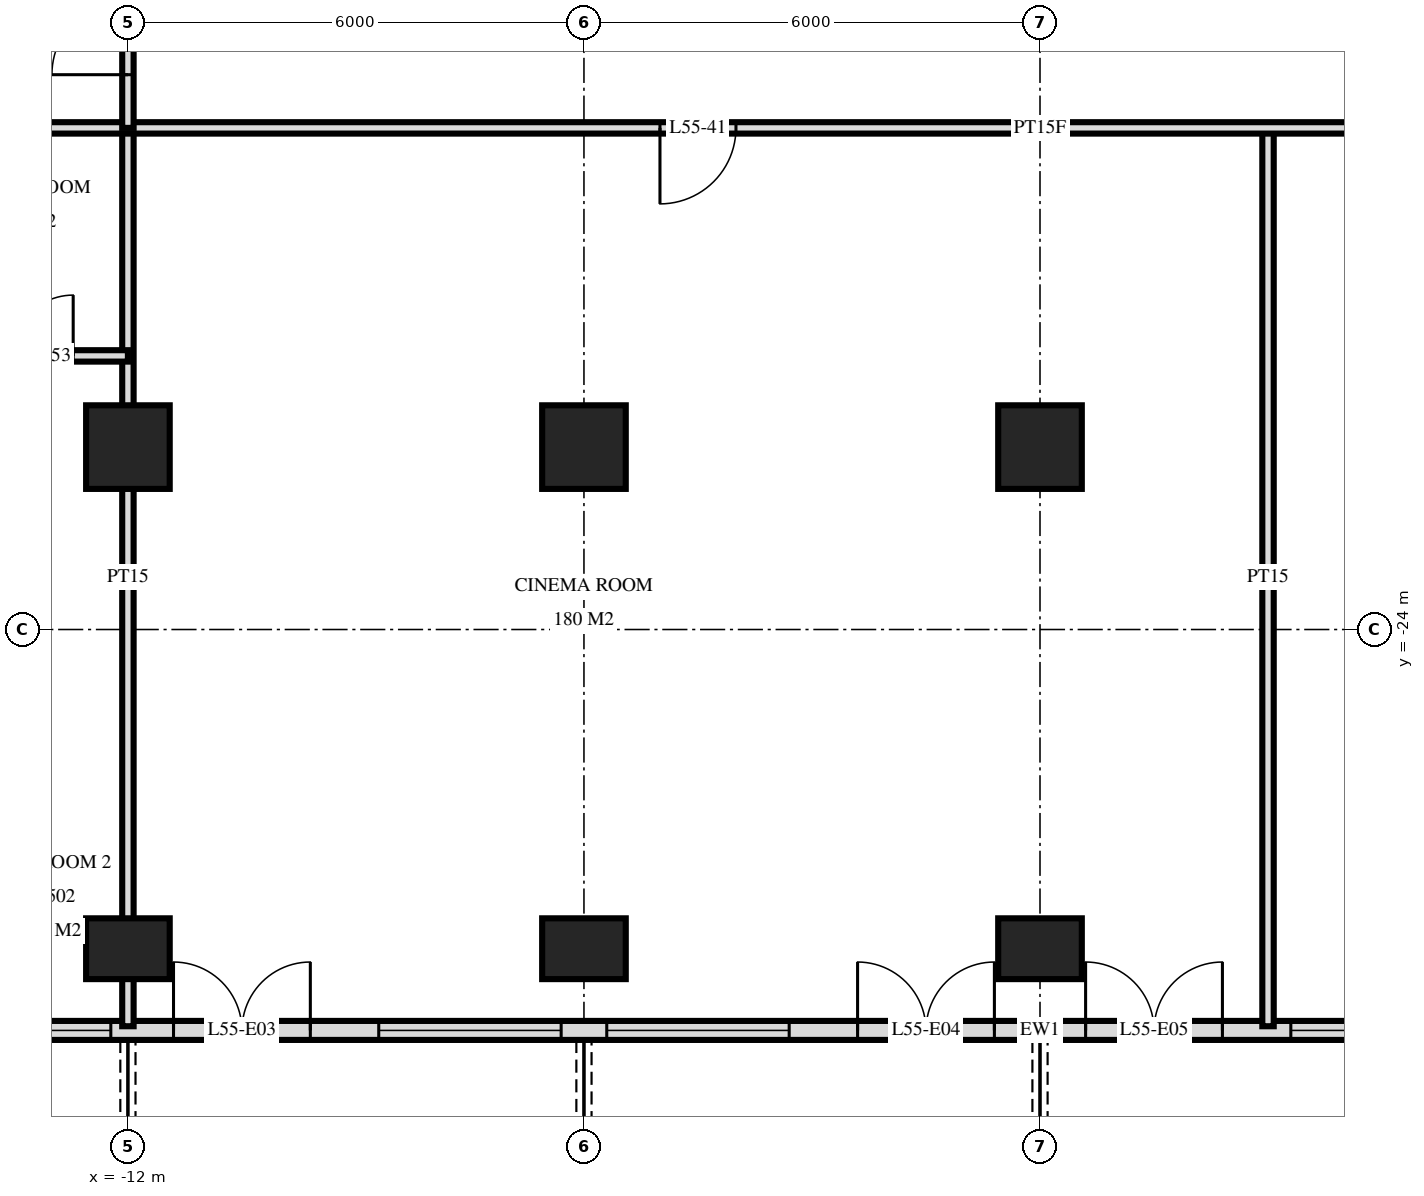
"""IFC4 building model, lengths in metres.
Left out: names, types, materials, properties, quantities, classifications, styles, units other than length and angle.
Written with IfcOpenShell. Run it as: python <this file> out.ifc"""

import sys

from ifc_helpers import new_model, si_unit, direction, frame, frame_2d, origin, origin_2d, place, context, subcontext, project, spatial, rectangle, extrude, element, fill, save


model = new_model("IFC4")
c1 = context("Model", 3, precision=1e-05, world=origin(), true_north=direction((0.0, 1.0)))
c2 = subcontext(c1, "Body", "Model", "MODEL_VIEW")
j1 = project(units=[si_unit("LENGTHUNIT", "METRE"), si_unit("PLANEANGLEUNIT", "RADIAN")], contexts=[c1])
p1 = place(None, origin())
s1 = spatial("IfcSite", under=j1, at=p1, CompositionType="ELEMENT")
p2 = place(p1, origin())
s2 = spatial("IfcBuilding", under=s1, at=p2, CompositionType="ELEMENT")
p3 = place(p2, frame((0.0, 0.0, 211.6)))
s3 = spatial("IfcBuildingStorey", under=s2, at=p3, CompositionType="ELEMENT", Elevation=211.6)
p4 = place(p3, frame((-12.0, -28.2, 0.0), z_axis=(0.0, 0.0, 1.0), x_axis=(1.0, 0.0, 0.0)))
e1 = element("IfcColumn", 1, at=p4, inside=s3, PredefinedType="COLUMN", context=c2, shape_type="SweptSolid", body=[
    extrude(rectangle(XDim=1.1, YDim=0.8, at=origin_2d()), origin(), (0.0, 0.0, 1.0), 3.5),
])
p5 = place(p3, frame((-12.0, -21.6, 0.0), z_axis=(0.0, 0.0, 1.0), x_axis=(1.0, 0.0, 0.0)))
e2 = element("IfcColumn", 2, at=p5, inside=s3, PredefinedType="COLUMN", context=c2, shape_type="SweptSolid", body=[
    extrude(rectangle(XDim=1.1, YDim=1.1, at=origin_2d()), origin(), (0.0, 0.0, 1.0), 3.5),
])
p6 = place(p3, frame((-6.0, -28.2, 0.0), z_axis=(0.0, 0.0, 1.0), x_axis=(1.0, 0.0, 0.0)))
e3 = element("IfcColumn", 3, at=p6, inside=s3, PredefinedType="COLUMN", context=c2, shape_type="SweptSolid", body=[
    extrude(rectangle(XDim=1.1, YDim=0.8, at=origin_2d()), origin(), (0.0, 0.0, 1.0), 3.5),
])
p7 = place(p3, frame((-6.0, -21.6, 0.0), z_axis=(0.0, 0.0, 1.0), x_axis=(1.0, 0.0, 0.0)))
e4 = element("IfcColumn", 4, at=p7, inside=s3, PredefinedType="COLUMN", context=c2, shape_type="SweptSolid", body=[
    extrude(rectangle(XDim=1.1, YDim=1.1, at=origin_2d()), origin(), (0.0, 0.0, 1.0), 3.5),
])
p8 = place(p3, frame((0.0, -28.2, 0.0), z_axis=(0.0, 0.0, 1.0), x_axis=(1.0, 0.0, 0.0)))
e5 = element("IfcColumn", 5, at=p8, inside=s3, PredefinedType="COLUMN", context=c2, shape_type="SweptSolid", body=[
    extrude(rectangle(XDim=1.1, YDim=0.8, at=origin_2d()), origin(), (0.0, 0.0, 1.0), 3.5),
])
p9 = place(p3, frame((0.0, -21.6, 0.0), z_axis=(0.0, 0.0, 1.0), x_axis=(1.0, 0.0, 0.0)))
e6 = element("IfcColumn", 6, at=p9, inside=s3, PredefinedType="COLUMN", context=c2, shape_type="SweptSolid", body=[
    extrude(rectangle(XDim=1.1, YDim=1.1, at=origin_2d()), origin(), (0.0, 0.0, 1.0), 3.5),
])
p10 = place(p3, frame((-22.475, -29.275, 0.0), z_axis=(0.0, 0.0, 1.0), x_axis=(1.0, 0.0, 0.0)))
e7 = element("IfcWall", 7, at=p10, inside=s3, PredefinedType="SOLIDWALL", context=c2, shape_type="SweptSolid", body=[
    extrude(rectangle(XDim=44.951, YDim=0.25, at=frame_2d((22.475, 0.0))), origin(), (0.0, 0.0, 1.0), 3.22),
])
p11 = place(p10, frame((0.575, 0.0, 0.0)))
e8 = element("IfcOpeningElement", 8, at=p11, cuts=e7, PredefinedType="OPENING", context=c2, shape_type="SweptSolid", body=[
    extrude(rectangle(XDim=1.8, YDim=2.4, at=frame_2d((0.9, 1.2))), frame((0.0, 0.135, 0.0), z_axis=(0.0, -1.0, 0.0), x_axis=(1.0, 0.0, 0.0)), (0.0, 0.0, 1.0), 0.27),
])
p12 = place(p10, frame((6.2, 0.0, 0.0)))
e9 = element("IfcOpeningElement", 9, at=p12, cuts=e7, PredefinedType="OPENING", context=c2, shape_type="SweptSolid", body=[
    extrude(rectangle(XDim=1.8, YDim=2.4, at=frame_2d((0.9, 1.2))), frame((0.0, 0.135, 0.0), z_axis=(0.0, -1.0, 0.0), x_axis=(1.0, 0.0, 0.0)), (0.0, 0.0, 1.0), 0.27),
])
p13 = place(p10, frame((8.45, 0.0, 0.9)))
e10 = element("IfcOpeningElement", 10, at=p13, cuts=e7, PredefinedType="OPENING", context=c2, shape_type="SweptSolid", body=[
    extrude(rectangle(XDim=1.8, YDim=1.5, at=frame_2d((0.9, 0.75))), frame((0.0, 0.135, 0.0), z_axis=(0.0, -1.0, 0.0), x_axis=(1.0, 0.0, 0.0)), (0.0, 0.0, 1.0), 0.27),
])
p14 = place(p10, frame((11.075, 0.0, 0.0)))
e11 = element("IfcOpeningElement", 11, at=p14, cuts=e7, PredefinedType="OPENING", context=c2, shape_type="SweptSolid", body=[
    extrude(rectangle(XDim=1.8, YDim=2.4, at=frame_2d((0.9, 1.2))), frame((0.0, 0.135, 0.0), z_axis=(0.0, -1.0, 0.0), x_axis=(1.0, 0.0, 0.0)), (0.0, 0.0, 1.0), 0.27),
])
p15 = place(p10, frame((13.775, 0.0, 0.9)))
e12 = element("IfcOpeningElement", 12, at=p15, cuts=e7, PredefinedType="OPENING", context=c2, shape_type="SweptSolid", body=[
    extrude(rectangle(XDim=2.4, YDim=1.5, at=frame_2d((1.2, 0.75))), frame((0.0, 0.135, 0.0), z_axis=(0.0, -1.0, 0.0), x_axis=(1.0, 0.0, 0.0)), (0.0, 0.0, 1.0), 0.27),
])
p16 = place(p10, frame((16.775, 0.0, 0.9)))
e13 = element("IfcOpeningElement", 13, at=p16, cuts=e7, PredefinedType="OPENING", context=c2, shape_type="SweptSolid", body=[
    extrude(rectangle(XDim=2.4, YDim=1.5, at=frame_2d((1.2, 0.75))), frame((0.0, 0.135, 0.0), z_axis=(0.0, -1.0, 0.0), x_axis=(1.0, 0.0, 0.0)), (0.0, 0.0, 1.0), 0.27),
])
p17 = place(p10, frame((20.075, 0.0, 0.0)))
e14 = element("IfcOpeningElement", 14, at=p17, cuts=e7, PredefinedType="OPENING", context=c2, shape_type="SweptSolid", body=[
    extrude(rectangle(XDim=1.8, YDim=2.4, at=frame_2d((0.9, 1.2))), frame((0.0, 0.135, 0.0), z_axis=(0.0, -1.0, 0.0), x_axis=(1.0, 0.0, 0.0)), (0.0, 0.0, 1.0), 0.27),
])
p18 = place(p10, frame((23.075, 0.0, 0.0)))
e15 = element("IfcOpeningElement", 15, at=p18, cuts=e7, PredefinedType="OPENING", context=c2, shape_type="SweptSolid", body=[
    extrude(rectangle(XDim=1.8, YDim=2.4, at=frame_2d((0.9, 1.2))), frame((0.0, 0.135, 0.0), z_axis=(0.0, -1.0, 0.0), x_axis=(1.0, 0.0, 0.0)), (0.0, 0.0, 1.0), 0.27),
])
p19 = place(p10, frame((25.775, 0.0, 0.9)))
e16 = element("IfcOpeningElement", 16, at=p19, cuts=e7, PredefinedType="OPENING", context=c2, shape_type="SweptSolid", body=[
    extrude(rectangle(XDim=2.4, YDim=1.5, at=frame_2d((1.2, 0.75))), frame((0.0, 0.135, 0.0), z_axis=(0.0, -1.0, 0.0), x_axis=(1.0, 0.0, 0.0)), (0.0, 0.0, 1.0), 0.27),
])
p20 = place(p10, frame((29.075, 0.0, 0.0)))
e17 = element("IfcOpeningElement", 17, at=p20, cuts=e7, PredefinedType="OPENING", context=c2, shape_type="SweptSolid", body=[
    extrude(rectangle(XDim=1.8, YDim=2.4, at=frame_2d((0.9, 1.2))), frame((0.0, 0.135, 0.0), z_axis=(0.0, -1.0, 0.0), x_axis=(1.0, 0.0, 0.0)), (0.0, 0.0, 1.0), 0.27),
])
p21 = place(p10, frame((31.775, 0.0, 0.9)))
e18 = element("IfcOpeningElement", 18, at=p21, cuts=e7, PredefinedType="OPENING", context=c2, shape_type="SweptSolid", body=[
    extrude(rectangle(XDim=2.4, YDim=1.5, at=frame_2d((1.2, 0.75))), frame((0.0, 0.135, 0.0), z_axis=(0.0, -1.0, 0.0), x_axis=(1.0, 0.0, 0.0)), (0.0, 0.0, 1.0), 0.27),
])
p22 = place(p10, frame((34.775, 0.0, 0.9)))
e19 = element("IfcOpeningElement", 19, at=p22, cuts=e7, PredefinedType="OPENING", context=c2, shape_type="SweptSolid", body=[
    extrude(rectangle(XDim=2.4, YDim=1.5, at=frame_2d((1.2, 0.75))), frame((0.0, 0.135, 0.0), z_axis=(0.0, -1.0, 0.0), x_axis=(1.0, 0.0, 0.0)), (0.0, 0.0, 1.0), 0.27),
])
p23 = place(p10, frame((38.075, 0.0, 0.0)))
e20 = element("IfcOpeningElement", 20, at=p23, cuts=e7, PredefinedType="OPENING", context=c2, shape_type="SweptSolid", body=[
    extrude(rectangle(XDim=1.8, YDim=2.4, at=frame_2d((0.9, 1.2))), frame((0.0, 0.135, 0.0), z_axis=(0.0, -1.0, 0.0), x_axis=(1.0, 0.0, 0.0)), (0.0, 0.0, 1.0), 0.27),
])
p24 = place(p10, frame((41.075, 0.0, 0.0)))
e21 = element("IfcOpeningElement", 21, at=p24, cuts=e7, PredefinedType="OPENING", context=c2, shape_type="SweptSolid", body=[
    extrude(rectangle(XDim=1.8, YDim=2.4, at=frame_2d((0.9, 1.2))), frame((0.0, 0.135, 0.0), z_axis=(0.0, -1.0, 0.0), x_axis=(1.0, 0.0, 0.0)), (0.0, 0.0, 1.0), 0.27),
])
p25 = place(p3, frame((3.0, -29.22, 0.0), z_axis=(0.0, 0.0, 1.0), x_axis=(0.0, 1.0, 0.0)))
e22 = element("IfcWall", 22, at=p25, inside=s3, PredefinedType="PARTITIONING", context=c2, shape_type="SweptSolid", body=[
    extrude(rectangle(XDim=11.82, YDim=0.15, at=frame_2d((5.91, 0.0))), origin(), (0.0, 0.0, 1.0), 3.22),
])
p26 = place(p3, frame((-12.0, -17.4, 0.0), z_axis=(0.0, 0.0, 1.0), x_axis=(0.0, 1.0, 0.0)))
e23 = element("IfcWall", 23, at=p26, inside=s3, PredefinedType="PARTITIONING", context=c2, shape_type="SweptSolid", body=[
    extrude(rectangle(XDim=2.35, YDim=0.15, at=frame_2d((1.175, 0.0))), origin(), (0.0, 0.0, 1.0), 3.22),
])
p27 = place(p26, frame((0.7, 0.0, 0.0)))
e24 = element("IfcOpeningElement", 24, at=p27, cuts=e23, PredefinedType="OPENING", context=c2, shape_type="SweptSolid", body=[
    extrude(rectangle(XDim=1.0, YDim=2.1, at=frame_2d((0.5, 1.05))), frame((0.0, 0.085, 0.0), z_axis=(0.0, -1.0, 0.0), x_axis=(1.0, 0.0, 0.0)), (0.0, 0.0, 1.0), 0.17),
])
p28 = place(p3, frame((-12.0, -29.22, 0.0), z_axis=(0.0, 0.0, 1.0), x_axis=(0.0, 1.0, 0.0)))
e25 = element("IfcWall", 25, at=p28, inside=s3, PredefinedType="PARTITIONING", context=c2, shape_type="SweptSolid", body=[
    extrude(rectangle(XDim=11.82, YDim=0.15, at=frame_2d((5.91, 0.0))), origin(), (0.0, 0.0, 1.0), 3.22),
])
p29 = place(p3, frame((-14.25, -20.4, 0.0), z_axis=(0.0, 0.0, 1.0), x_axis=(1.0, 0.0, 0.0)))
e26 = element("IfcWall", 26, at=p29, inside=s3, PredefinedType="PARTITIONING", context=c2, shape_type="SweptSolid", body=[
    extrude(rectangle(XDim=2.25, YDim=0.15, at=frame_2d((1.125, 0.0))), origin(), (0.0, 0.0, 1.0), 3.22),
])
p30 = place(p29, frame((0.73, 0.0, 0.0)))
e27 = element("IfcOpeningElement", 27, at=p30, cuts=e26, PredefinedType="OPENING", context=c2, shape_type="SweptSolid", body=[
    extrude(rectangle(XDim=0.8, YDim=2.1, at=frame_2d((0.4, 1.05))), frame((0.0, 0.085, 0.0), z_axis=(0.0, -1.0, 0.0), x_axis=(1.0, 0.0, 0.0)), (0.0, 0.0, 1.0), 0.17),
])
p31 = place(p3, frame((-26.82, -17.4, 0.0), z_axis=(0.0, 0.0, 1.0), x_axis=(1.0, 0.0, 0.0)))
e28 = element("IfcWall", 28, at=p31, inside=s3, PredefinedType="PARTITIONING", context=c2, shape_type="SweptSolid", body=[
    extrude(rectangle(XDim=53.64, YDim=0.15, at=frame_2d((26.82, 0.0))), origin(), (0.0, 0.0, 1.0), 3.22),
])
p32 = place(p31, frame((4.92, 0.0, 0.0)))
e29 = element("IfcOpeningElement", 29, at=p32, cuts=e28, PredefinedType="OPENING", context=c2, shape_type="SweptSolid", body=[
    extrude(rectangle(XDim=1.0, YDim=2.1, at=frame_2d((0.5, 1.05))), frame((0.0, 0.085, 0.0), z_axis=(0.0, -1.0, 0.0), x_axis=(1.0, 0.0, 0.0)), (0.0, 0.0, 1.0), 0.17),
])
p33 = place(p31, frame((1.62, 0.0, 0.0)))
e30 = element("IfcOpeningElement", 30, at=p33, cuts=e28, PredefinedType="OPENING", context=c2, shape_type="SweptSolid", body=[
    extrude(rectangle(XDim=1.0, YDim=2.1, at=frame_2d((0.5, 1.05))), frame((0.0, 0.085, 0.0), z_axis=(0.0, -1.0, 0.0), x_axis=(1.0, 0.0, 0.0)), (0.0, 0.0, 1.0), 0.17),
])
p34 = place(p31, frame((41.17, 0.0, 0.0)))
e31 = element("IfcOpeningElement", 31, at=p34, cuts=e28, PredefinedType="OPENING", context=c2, shape_type="SweptSolid", body=[
    extrude(rectangle(XDim=1.0, YDim=2.1, at=frame_2d((0.5, 1.05))), frame((0.0, 0.085, 0.0), z_axis=(0.0, -1.0, 0.0), x_axis=(1.0, 0.0, 0.0)), (0.0, 0.0, 1.0), 0.17),
])
p35 = place(p31, frame((49.42, 0.0, 0.0)))
e32 = element("IfcOpeningElement", 32, at=p35, cuts=e28, PredefinedType="OPENING", context=c2, shape_type="SweptSolid", body=[
    extrude(rectangle(XDim=1.0, YDim=2.1, at=frame_2d((0.5, 1.05))), frame((0.0, 0.085, 0.0), z_axis=(0.0, -1.0, 0.0), x_axis=(1.0, 0.0, 0.0)), (0.0, 0.0, 1.0), 0.17),
])
p36 = place(p31, frame((47.62, 0.0, 0.0)))
e33 = element("IfcOpeningElement", 33, at=p36, cuts=e28, PredefinedType="OPENING", context=c2, shape_type="SweptSolid", body=[
    extrude(rectangle(XDim=1.0, YDim=2.1, at=frame_2d((0.5, 1.05))), frame((0.0, 0.085, 0.0), z_axis=(0.0, -1.0, 0.0), x_axis=(1.0, 0.0, 0.0)), (0.0, 0.0, 1.0), 0.17),
])
p37 = place(p31, frame((21.82, 0.0, 0.0)))
e34 = element("IfcOpeningElement", 34, at=p37, cuts=e28, PredefinedType="OPENING", context=c2, shape_type="SweptSolid", body=[
    extrude(rectangle(XDim=1.0, YDim=2.1, at=frame_2d((0.5, 1.05))), frame((0.0, 0.085, 0.0), z_axis=(0.0, -1.0, 0.0), x_axis=(1.0, 0.0, 0.0)), (0.0, 0.0, 1.0), 0.17),
])
p38 = place(p31, frame((33.82, 0.0, 0.0)))
e35 = element("IfcOpeningElement", 35, at=p38, cuts=e28, PredefinedType="OPENING", context=c2, shape_type="SweptSolid", body=[
    extrude(rectangle(XDim=1.0, YDim=2.1, at=frame_2d((0.5, 1.05))), frame((0.0, 0.085, 0.0), z_axis=(0.0, -1.0, 0.0), x_axis=(1.0, 0.0, 0.0)), (0.0, 0.0, 1.0), 0.17),
])
p39 = place(p13, origin())
e36 = element("IfcWindow", 36, at=p39, inside=s3, PartitioningType="SINGLE_PANEL", PredefinedType="WINDOW", context=c2, shape_type="SweptSolid", body=[
    extrude(rectangle(XDim=1.8, YDim=1.5, at=frame_2d((0.9, 0.75))), frame((0.0, 0.03, 0.0), z_axis=(0.0, -1.0, 0.0), x_axis=(1.0, 0.0, 0.0)), (0.0, 0.0, 1.0), 0.06),
])
fill(e10, e36)
p40 = place(p14, origin())
e37 = element("IfcDoor", 37, at=p40, inside=s3, OperationType="DOUBLE_DOOR_SINGLE_SWING", PredefinedType="DOOR", context=c2, shape_type="SweptSolid", body=[
    extrude(rectangle(XDim=1.8, YDim=2.4, at=frame_2d((0.9, 1.2))), frame((0.0, 0.025, 0.0), z_axis=(0.0, -1.0, 0.0), x_axis=(1.0, 0.0, 0.0)), (0.0, 0.0, 1.0), 0.05),
])
fill(e11, e37)
p41 = place(p15, origin())
e38 = element("IfcWindow", 38, at=p41, inside=s3, PartitioningType="SINGLE_PANEL", PredefinedType="WINDOW", context=c2, shape_type="SweptSolid", body=[
    extrude(rectangle(XDim=2.4, YDim=1.5, at=frame_2d((1.2, 0.75))), frame((0.0, 0.03, 0.0), z_axis=(0.0, -1.0, 0.0), x_axis=(1.0, 0.0, 0.0)), (0.0, 0.0, 1.0), 0.06),
])
fill(e12, e38)
p42 = place(p16, origin())
e39 = element("IfcWindow", 39, at=p42, inside=s3, PartitioningType="SINGLE_PANEL", PredefinedType="WINDOW", context=c2, shape_type="SweptSolid", body=[
    extrude(rectangle(XDim=2.4, YDim=1.5, at=frame_2d((1.2, 0.75))), frame((0.0, 0.03, 0.0), z_axis=(0.0, -1.0, 0.0), x_axis=(1.0, 0.0, 0.0)), (0.0, 0.0, 1.0), 0.06),
])
fill(e13, e39)
p43 = place(p17, origin())
e40 = element("IfcDoor", 40, at=p43, inside=s3, OperationType="DOUBLE_DOOR_SINGLE_SWING", PredefinedType="DOOR", context=c2, shape_type="SweptSolid", body=[
    extrude(rectangle(XDim=1.8, YDim=2.4, at=frame_2d((0.9, 1.2))), frame((0.0, 0.025, 0.0), z_axis=(0.0, -1.0, 0.0), x_axis=(1.0, 0.0, 0.0)), (0.0, 0.0, 1.0), 0.05),
])
fill(e14, e40)
p44 = place(p18, origin())
e41 = element("IfcDoor", 41, at=p44, inside=s3, OperationType="DOUBLE_DOOR_SINGLE_SWING", PredefinedType="DOOR", context=c2, shape_type="SweptSolid", body=[
    extrude(rectangle(XDim=1.8, YDim=2.4, at=frame_2d((0.9, 1.2))), frame((0.0, 0.025, 0.0), z_axis=(0.0, -1.0, 0.0), x_axis=(1.0, 0.0, 0.0)), (0.0, 0.0, 1.0), 0.05),
])
fill(e15, e41)
p45 = place(p19, origin())
e42 = element("IfcWindow", 42, at=p45, inside=s3, PartitioningType="SINGLE_PANEL", PredefinedType="WINDOW", context=c2, shape_type="SweptSolid", body=[
    extrude(rectangle(XDim=2.4, YDim=1.5, at=frame_2d((1.2, 0.75))), frame((0.0, 0.03, 0.0), z_axis=(0.0, -1.0, 0.0), x_axis=(1.0, 0.0, 0.0)), (0.0, 0.0, 1.0), 0.06),
])
fill(e16, e42)
p46 = place(p27, origin())
e43 = element("IfcDoor", 43, at=p46, inside=s3, OperationType="SINGLE_SWING_RIGHT", PredefinedType="DOOR", context=c2, shape_type="SweptSolid", body=[
    extrude(rectangle(XDim=1.0, YDim=2.1, at=frame_2d((0.5, 1.05))), frame((0.0, 0.025, 0.0), z_axis=(0.0, -1.0, 0.0), x_axis=(1.0, 0.0, 0.0)), (0.0, 0.0, 1.0), 0.05),
])
fill(e24, e43)
p47 = place(p37, frame((0.5, 0.0, 0.0), z_axis=(0.0, 0.0, 1.0), x_axis=(-1.0, 0.0, 0.0)))
e44 = element("IfcDoor", 44, at=p47, inside=s3, OperationType="SINGLE_SWING_LEFT", PredefinedType="DOOR", context=c2, shape_type="SweptSolid", body=[
    extrude(rectangle(XDim=1.0, YDim=2.1, at=frame_2d((0.0, 1.05))), frame((0.0, -0.025, 0.0), z_axis=(0.0, 1.0, 0.0), x_axis=(-1.0, 0.0, 0.0)), (0.0, 0.0, 1.0), 0.05),
])
fill(e34, e44)
p48 = place(p30, origin())
e45 = element("IfcDoor", 45, at=p48, inside=s3, OperationType="SINGLE_SWING_LEFT", PredefinedType="DOOR", context=c2, shape_type="SweptSolid", body=[
    extrude(rectangle(XDim=0.8, YDim=2.1, at=frame_2d((0.4, 1.05))), frame((0.0, 0.025, 0.0), z_axis=(0.0, -1.0, 0.0), x_axis=(1.0, 0.0, 0.0)), (0.0, 0.0, 1.0), 0.05),
])
fill(e27, e45)
save(model, sys.argv[1])
